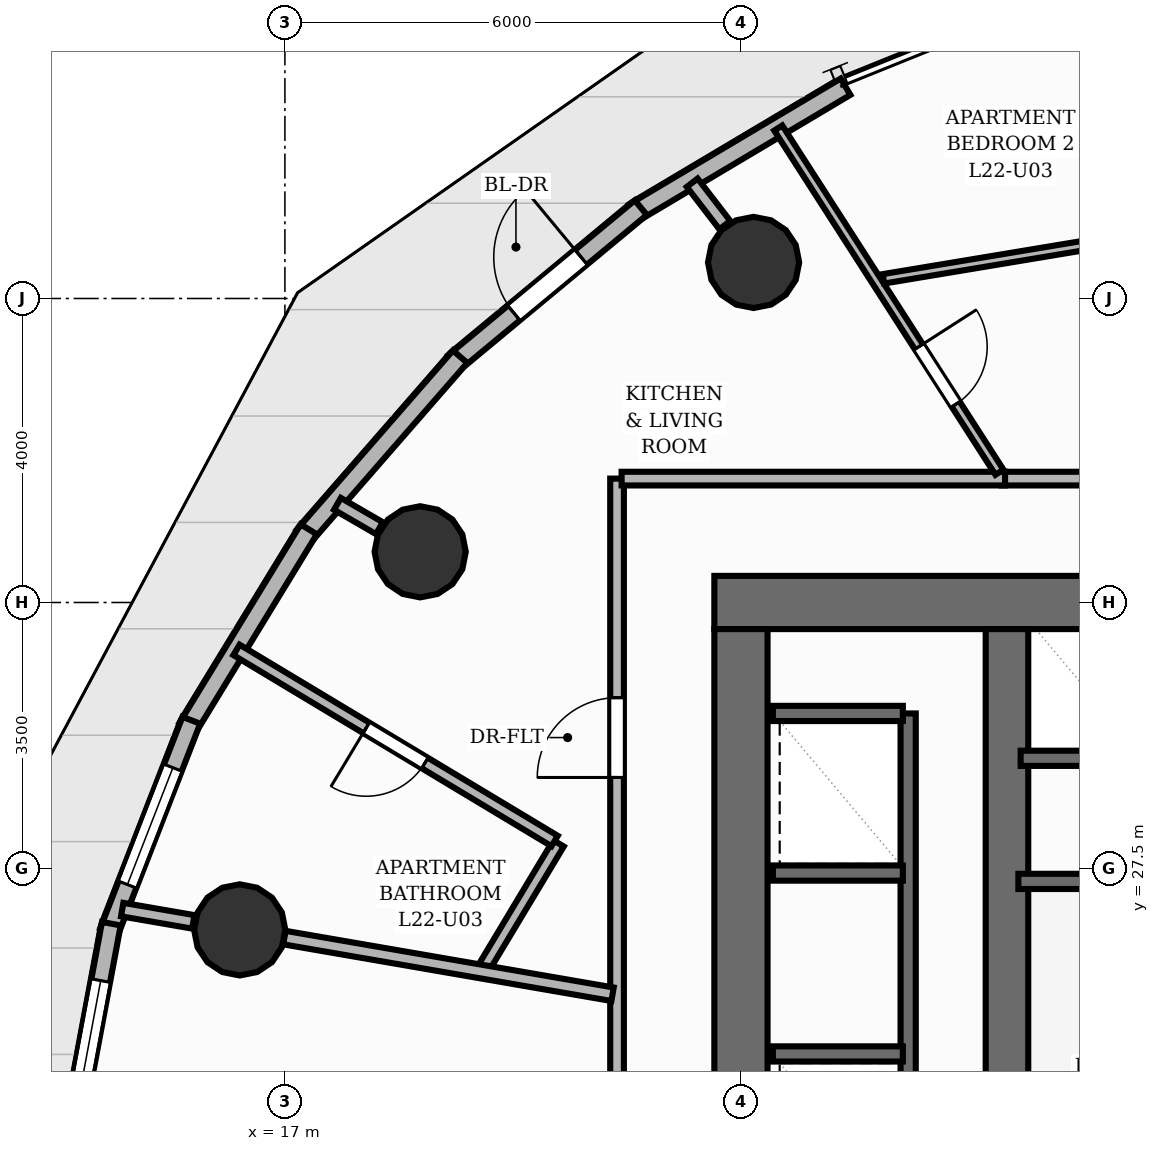
"""IFC4 building model, lengths in metres.
Left out: names, types, materials, properties, quantities, classifications, styles, units other than length and angle.
Written with IfcOpenShell. Run it as: python <this file> out.ifc"""

import sys

from ifc_helpers import new_model, si_unit, direction, frame, frame_2d, origin, origin_2d, place, context, subcontext, project, spatial, rectangle, circle, extrude, element, fill, save


model = new_model("IFC4")
c1 = context("Model", 3, precision=1e-05, world=origin(), true_north=direction((0.0, 1.0)))
c2 = subcontext(c1, "Body", "Model", "MODEL_VIEW")
j1 = project(units=[si_unit("LENGTHUNIT", "METRE"), si_unit("PLANEANGLEUNIT", "RADIAN")], contexts=[c1])
p1 = place(None, origin())
s1 = spatial("IfcSite", under=j1, at=p1, CompositionType="ELEMENT")
p2 = place(p1, origin())
s2 = spatial("IfcBuilding", under=s1, at=p2, CompositionType="ELEMENT")
p3 = place(p2, frame((0.0, 0.0, 77.28)))
s3 = spatial("IfcBuildingStorey", under=s2, at=p3, CompositionType="ELEMENT", Elevation=77.28)
p4 = place(p3, frame((22.65, 31.0, 0.0), z_axis=(0.0, 0.0, 1.0), x_axis=(1.0, 0.0, 0.0)))
e1 = element("IfcWall", 1, at=p4, inside=s3, PredefinedType="SHEAR", context=c2, shape_type="SweptSolid", body=[
    extrude(rectangle(XDim=18.7, YDim=0.7, at=frame_2d((9.35, 0.0))), origin(), (0.0, 0.0, 1.0), 3.2),
])
p5 = place(p4, frame((11.75, 0.0, 0.0)))
e2 = element("IfcOpeningElement", 2, at=p5, cuts=e1, PredefinedType="OPENING", context=c2, shape_type="SweptSolid", body=[
    extrude(rectangle(XDim=1.1, YDim=2.15, at=frame_2d((0.55, 1.075))), frame((0.0, 0.36, 0.0), z_axis=(0.0, -1.0, 0.0), x_axis=(1.0, 0.0, 0.0)), (0.0, 0.0, 1.0), 0.72),
])
p6 = place(p3, frame((23.0, 17.35, 0.0), z_axis=(0.0, 0.0, 1.0), x_axis=(0.0, 1.0, 0.0)))
e3 = element("IfcWall", 3, at=p6, inside=s3, PredefinedType="SHEAR", context=c2, shape_type="SweptSolid", body=[
    extrude(rectangle(XDim=13.3, YDim=0.7, at=frame_2d((6.65, 0.0))), origin(), (0.0, 0.0, 1.0), 3.2),
])
p7 = place(p3, frame((26.5, 17.35, 0.0), z_axis=(0.0, 0.0, 1.0), x_axis=(0.0, 1.0, 0.0)))
e4 = element("IfcWall", 4, at=p7, inside=s3, PredefinedType="SHEAR", context=c2, shape_type="SweptSolid", body=[
    extrude(rectangle(XDim=13.3, YDim=0.56, at=frame_2d((6.65, 0.0))), origin(), (0.0, 0.0, 1.0), 3.2),
])
for number, where, z_axis, x_axis in (
    (5, (23.167, 35.474, 0.0), (0.0, 0.0, 1.0), (1.0, 0.0, 0.0)),
    (6, (18.78, 31.667, 0.0), (0.0, 0.0, 1.0), (1.0, 0.0, 0.0)),
    (7, (16.406, 26.692, 0.0), (0.0, 0.0, 1.0), (1.0, 0.0, 0.0)),
):
    element("IfcColumn", number, at=place(p3, frame(where, z_axis=z_axis, x_axis=x_axis)), inside=s3, PredefinedType="COLUMN", context=c2, shape_type="SweptSolid", body=[
        extrude(circle(Radius=0.6, at=origin_2d()), origin(), (0.0, 0.0, 1.0), 3.2),
    ])
p8 = place(p3, frame((21.594, 36.132, 0.0), z_axis=(0.0, 0.0, 1.0), x_axis=(0.859543053771, 0.511063341196, 0.0)))
e8 = element("IfcWall", 8, at=p8, inside=s3, PredefinedType="SOLIDWALL", context=c2, shape_type="SweptSolid", body=[
    extrude(rectangle(XDim=3.236, YDim=0.25, at=frame_2d((1.618, 0.0))), origin(), (0.0, 0.0, 1.0), 2.96),
])
p9 = place(p3, frame((19.227, 34.157, 0.0), z_axis=(0.0, 0.0, 1.0), x_axis=(0.769611275013, 0.638512713557, 0.0)))
e9 = element("IfcWall", 9, at=p9, inside=s3, PredefinedType="SOLIDWALL", context=c2, shape_type="SweptSolid", body=[
    extrude(rectangle(XDim=3.192, YDim=0.25, at=frame_2d((1.596, 0.0))), origin(), (0.0, 0.0, 1.0), 2.96),
])
p10 = place(p9, frame((1.021, 0.0, 0.0)))
e10 = element("IfcOpeningElement", 10, at=p10, cuts=e9, PredefinedType="OPENING", context=c2, shape_type="SweptSolid", body=[
    extrude(rectangle(XDim=1.15, YDim=2.2, at=frame_2d((0.575, 1.1))), frame((0.0, 0.135, 0.0), z_axis=(0.0, -1.0, 0.0), x_axis=(1.0, 0.0, 0.0)), (0.0, 0.0, 1.0), 0.27),
])
p11 = place(p3, frame((17.248, 31.873, 0.0), z_axis=(0.0, 0.0, 1.0), x_axis=(0.656940925155, 0.753942054044, 0.0)))
e11 = element("IfcWall", 11, at=p11, inside=s3, PredefinedType="SOLIDWALL", context=c2, shape_type="SweptSolid", body=[
    extrude(rectangle(XDim=3.131, YDim=0.25, at=frame_2d((1.565, 0.0))), origin(), (0.0, 0.0, 1.0), 2.96),
])
p12 = place(p3, frame((15.719, 29.35, 0.0), z_axis=(0.0, 0.0, 1.0), x_axis=(0.520956264952, 0.853583370273, 0.0)))
e12 = element("IfcWall", 12, at=p12, inside=s3, PredefinedType="SOLIDWALL", context=c2, shape_type="SweptSolid", body=[
    extrude(rectangle(XDim=3.061, YDim=0.25, at=frame_2d((1.53, 0.0))), origin(), (0.0, 0.0, 1.0), 2.96),
])
p13 = place(p3, frame((14.686, 26.665, 0.0), z_axis=(0.0, 0.0, 1.0), x_axis=(0.362414720493, 0.93201693674, 0.0)))
e13 = element("IfcWall", 13, at=p13, inside=s3, PredefinedType="SOLIDWALL", context=c2, shape_type="SweptSolid", body=[
    extrude(rectangle(XDim=2.988, YDim=0.25, at=frame_2d((1.494, 0.0))), origin(), (0.0, 0.0, 1.0), 2.96),
])
p14 = place(p13, frame((0.669, 0.0, 0.85)))
e14 = element("IfcOpeningElement", 14, at=p14, cuts=e13, PredefinedType="OPENING", context=c2, shape_type="SweptSolid", body=[
    extrude(rectangle(XDim=1.65, YDim=1.37, at=frame_2d((0.825, 0.685))), frame((0.0, 0.135, 0.0), z_axis=(0.0, -1.0, 0.0), x_axis=(1.0, 0.0, 0.0)), (0.0, 0.0, 1.0), 0.27),
])
p15 = place(p3, frame((14.179, 23.9, 0.0), z_axis=(0.0, 0.0, 1.0), x_axis=(0.183975908968, 0.982930752861, 0.0)))
e15 = element("IfcWall", 15, at=p15, inside=s3, PredefinedType="SOLIDWALL", context=c2, shape_type="SweptSolid", body=[
    extrude(rectangle(XDim=2.923, YDim=0.25, at=frame_2d((1.462, 0.0))), origin(), (0.0, 0.0, 1.0), 2.96),
])
p16 = place(p15, frame((0.762, 0.0, 0.85)))
e16 = element("IfcOpeningElement", 16, at=p16, cuts=e15, PredefinedType="OPENING", context=c2, shape_type="SweptSolid", body=[
    extrude(rectangle(XDim=1.4, YDim=1.55, at=frame_2d((0.7, 0.775))), frame((0.0, 0.135, 0.0), z_axis=(0.0, -1.0, 0.0), x_axis=(1.0, 0.0, 0.0)), (0.0, 0.0, 1.0), 0.27),
])
p17 = place(p3, frame((26.65, 27.33, 0.0), z_axis=(0.0, 0.0, 1.0), x_axis=(1.0, 0.0, 0.0)))
e17 = element("IfcWall", 17, at=p17, inside=s3, PredefinedType="SHEAR", context=c2, shape_type="SweptSolid", body=[
    extrude(rectangle(XDim=3.24, YDim=0.2, at=frame_2d((1.62, 0.0))), origin(), (0.0, 0.0, 1.0), 3.2),
])
p18 = place(p3, frame((25.2, 18.46, 0.0), z_axis=(0.0, 0.0, 1.0), x_axis=(0.0, 1.0, 0.0)))
e18 = element("IfcWall", 18, at=p18, inside=s3, PredefinedType="SHEAR", context=c2, shape_type="SweptSolid", body=[
    extrude(rectangle(XDim=11.08, YDim=0.2, at=frame_2d((5.54, 0.0))), origin(), (0.0, 0.0, 1.0), 3.2),
])
for number, where, z_axis, x_axis in (
    (19, (23.42, 29.54, 0.0), (0.0, 0.0, 1.0), (1.0, 0.0, 0.0)),
    (20, (23.42, 25.06, 0.0), (0.0, 0.0, 1.0), (1.0, 0.0, 0.0)),
    (21, (23.42, 27.44, 0.0), (0.0, 0.0, 1.0), (1.0, 0.0, 0.0)),
):
    element("IfcWall", number, at=place(p3, frame(where, z_axis=z_axis, x_axis=x_axis)), inside=s3, PredefinedType="SHEAR", context=c2, shape_type="SweptSolid", body=[
        extrude(rectangle(XDim=1.71, YDim=0.2, at=frame_2d((0.855, 0.0))), origin(), (0.0, 0.0, 1.0), 3.2),
    ])
p19 = place(p3, frame((26.68, 28.95, 0.0), z_axis=(0.0, 0.0, 1.0), x_axis=(1.0, 0.0, 0.0)))
e22 = element("IfcWall", 22, at=p19, inside=s3, PredefinedType="SHEAR", context=c2, shape_type="SweptSolid", body=[
    extrude(rectangle(XDim=5.24, YDim=0.2, at=frame_2d((2.62, 0.0))), origin(), (0.0, 0.0, 1.0), 3.2),
])
p20 = place(p3, frame((22.788, 35.966, 0.0), z_axis=(0.0, 0.0, 1.0), x_axis=(-0.609945476355, 0.792443383387, 0.0)))
e23 = element("IfcWall", 23, at=p20, inside=s3, PredefinedType="PARTITIONING", context=c2, shape_type="SweptSolid", body=[
    extrude(rectangle(XDim=0.704, YDim=0.18, at=frame_2d((0.352, 0.0))), origin(), (0.0, 0.0, 1.0), 2.26),
])
p21 = place(p3, frame((18.243, 31.978, 0.0), z_axis=(0.0, 0.0, 1.0), x_axis=(-0.864928236137, 0.501895553212, 0.0)))
e24 = element("IfcWall", 24, at=p21, inside=s3, PredefinedType="PARTITIONING", context=c2, shape_type="SweptSolid", body=[
    extrude(rectangle(XDim=0.638, YDim=0.18, at=frame_2d((0.319, 0.0))), origin(), (0.0, 0.0, 1.0), 2.26),
])
p22 = place(p3, frame((15.794, 26.798, 0.0), z_axis=(0.0, 0.0, 1.0), x_axis=(-0.985396187556, 0.170277284302, 0.0)))
e25 = element("IfcWall", 25, at=p22, inside=s3, PredefinedType="PARTITIONING", context=c2, shape_type="SweptSolid", body=[
    extrude(rectangle(XDim=0.949, YDim=0.18, at=frame_2d((0.475, 0.0))), origin(), (0.0, 0.0, 1.0), 2.26),
])
p23 = place(p3, frame((26.431, 32.63, 0.0), z_axis=(0.0, 0.0, 1.0), x_axis=(1.0, 0.0, 0.0)))
e26 = element("IfcWall", 26, at=p23, inside=s3, PredefinedType="PARTITIONING", context=c2, shape_type="SweptSolid", body=[
    extrude(rectangle(XDim=16.199, YDim=0.18, at=frame_2d((8.099, 0.0))), origin(), (0.0, 0.0, 1.0), 2.955),
])
p24 = place(p23, frame((11.645, 0.0, 0.0)))
e27 = element("IfcOpeningElement", 27, at=p24, cuts=e26, PredefinedType="OPENING", context=c2, shape_type="SweptSolid", body=[
    extrude(rectangle(XDim=1.05, YDim=2.15, at=frame_2d((0.525, 1.075))), frame((0.0, 0.1, 0.0), z_axis=(0.0, -1.0, 0.0), x_axis=(1.0, 0.0, 0.0)), (0.0, 0.0, 1.0), 0.2),
])
p25 = place(p3, frame((21.37, 15.37, 0.0), z_axis=(0.0, 0.0, 1.0), x_axis=(0.0, 1.0, 0.0)))
e28 = element("IfcWall", 28, at=p25, inside=s3, PredefinedType="PARTITIONING", context=c2, shape_type="SweptSolid", body=[
    extrude(rectangle(XDim=17.26, YDim=0.18, at=frame_2d((8.63, 0.0))), origin(), (0.0, 0.0, 1.0), 2.955),
])
p26 = place(p25, frame((13.328, 0.0, 0.0)))
e29 = element("IfcOpeningElement", 29, at=p26, cuts=e28, PredefinedType="OPENING", context=c2, shape_type="SweptSolid", body=[
    extrude(rectangle(XDim=1.05, YDim=2.15, at=frame_2d((0.525, 1.075))), frame((0.0, 0.1, 0.0), z_axis=(0.0, -1.0, 0.0), x_axis=(1.0, 0.0, 0.0)), (0.0, 0.0, 1.0), 0.2),
])
p27 = place(p25, frame((4.718, 0.0, 0.0)))
e30 = element("IfcOpeningElement", 30, at=p27, cuts=e28, PredefinedType="OPENING", context=c2, shape_type="SweptSolid", body=[
    extrude(rectangle(XDim=1.05, YDim=2.15, at=frame_2d((0.525, 1.075))), frame((0.0, 0.1, 0.0), z_axis=(0.0, -1.0, 0.0), x_axis=(1.0, 0.0, 0.0)), (0.0, 0.0, 1.0), 0.2),
])
p28 = place(p3, frame((21.43, 32.63, 0.0), z_axis=(0.0, 0.0, 1.0), x_axis=(1.0, 0.0, 0.0)))
e31 = element("IfcWall", 31, at=p28, inside=s3, PredefinedType="PARTITIONING", context=c2, shape_type="SweptSolid", body=[
    extrude(rectangle(XDim=5.045, YDim=0.18, at=frame_2d((2.522, 0.0))), origin(), (0.0, 0.0, 1.0), 2.955),
])
p29 = place(p3, frame((19.586, 26.143, 0.0), z_axis=(0.0, 0.0, 1.0), x_axis=(0.514969792399, 0.857208325272, 0.0)))
e32 = element("IfcWall", 32, at=p29, inside=s3, PredefinedType="PLUMBINGWALL", context=c2, shape_type="SweptSolid", body=[
    extrude(rectangle(XDim=1.969, YDim=0.16, at=frame_2d((0.984, 0.0))), origin(), (0.0, 0.0, 1.0), 2.955),
])
p30 = place(p3, frame((20.549, 27.862, 0.0), z_axis=(0.0, 0.0, 1.0), x_axis=(-0.857214854591, 0.514958923672, 0.0)))
e33 = element("IfcWall", 33, at=p30, inside=s3, PredefinedType="PLUMBINGWALL", context=c2, shape_type="SweptSolid", body=[
    extrude(rectangle(XDim=4.883, YDim=0.16, at=frame_2d((2.441, 0.0))), origin(), (0.0, 0.0, 1.0), 2.955),
])
p31 = place(p30, frame((1.991, 0.0, 0.0)))
e34 = element("IfcOpeningElement", 34, at=p31, cuts=e33, PredefinedType="OPENING", context=c2, shape_type="SweptSolid", body=[
    extrude(rectangle(XDim=0.9, YDim=2.1, at=frame_2d((0.45, 1.05))), frame((0.0, 0.09, 0.0), z_axis=(0.0, -1.0, 0.0), x_axis=(1.0, 0.0, 0.0)), (0.0, 0.0, 1.0), 0.18),
])
p32 = place(p3, frame((23.491, 37.243, 0.0), z_axis=(0.0, 0.0, 1.0), x_axis=(0.540565030624, -0.841302233247, 0.0)))
e35 = element("IfcWall", 35, at=p32, inside=s3, PredefinedType="PARTITIONING", context=c2, shape_type="SweptSolid", body=[
    extrude(rectangle(XDim=5.383, YDim=0.125, at=frame_2d((2.691, 0.0))), origin(), (0.0, 0.0, 1.0), 2.955),
])
p33 = place(p32, frame((3.42, 0.0, 0.0)))
e36 = element("IfcOpeningElement", 36, at=p33, cuts=e35, PredefinedType="OPENING", context=c2, shape_type="SweptSolid", body=[
    extrude(rectangle(XDim=0.9, YDim=2.1, at=frame_2d((0.45, 1.05))), frame((0.0, 0.073, 0.0), z_axis=(0.0, -1.0, 0.0), x_axis=(1.0, 0.0, 0.0)), (0.0, 0.0, 1.0), 0.145),
])
p34 = place(p3, frame((21.311, 25.845, 0.0), z_axis=(0.0, 0.0, 1.0), x_axis=(-0.98541310568, 0.170179349963, 0.0)))
e37 = element("IfcWall", 37, at=p34, inside=s3, PredefinedType="PARTITIONING", context=c2, shape_type="SweptSolid", body=[
    extrude(rectangle(XDim=4.381, YDim=0.18, at=frame_2d((2.191, 0.0))), origin(), (0.0, 0.0, 1.0), 2.26),
])
p35 = place(p3, frame((24.875, 35.259, 0.0), z_axis=(0.0, 0.0, 1.0), x_axis=(0.986466792703, 0.163961174958, 0.0)))
e38 = element("IfcWall", 38, at=p35, inside=s3, PredefinedType="PARTITIONING", context=c2, shape_type="SweptSolid", body=[
    extrude(rectangle(XDim=10.128, YDim=0.125, at=frame_2d((5.064, 0.0))), origin(), (0.0, 0.0, 1.0), 2.955),
])
p36 = place(p35, frame((5.034, 0.0, 0.0)))
e39 = element("IfcOpeningElement", 39, at=p36, cuts=e38, PredefinedType="OPENING", context=c2, shape_type="SweptSolid", body=[
    extrude(rectangle(XDim=0.9, YDim=2.1, at=frame_2d((0.45, 1.05))), frame((0.0, 0.073, 0.0), z_axis=(0.0, -1.0, 0.0), x_axis=(1.0, 0.0, 0.0)), (0.0, 0.0, 1.0), 0.145),
])
p37 = place(p10, origin())
e40 = element("IfcDoor", 40, at=p37, inside=s3, OperationType="SINGLE_SWING_RIGHT", PredefinedType="DOOR", context=c2, shape_type="SweptSolid", body=[
    extrude(rectangle(XDim=1.15, YDim=2.2, at=frame_2d((0.575, 1.1))), frame((0.0, 0.025, 0.0), z_axis=(0.0, -1.0, 0.0), x_axis=(1.0, 0.0, 0.0)), (0.0, 0.0, 1.0), 0.05),
])
fill(e10, e40)
p38 = place(p14, origin())
e41 = element("IfcWindow", 41, at=p38, inside=s3, PartitioningType="SINGLE_PANEL", PredefinedType="WINDOW", context=c2, shape_type="SweptSolid", body=[
    extrude(rectangle(XDim=1.65, YDim=1.37, at=frame_2d((0.825, 0.685))), frame((0.0, 0.03, 0.0), z_axis=(0.0, -1.0, 0.0), x_axis=(1.0, 0.0, 0.0)), (0.0, 0.0, 1.0), 0.06),
])
fill(e14, e41)
p39 = place(p16, origin())
e42 = element("IfcWindow", 42, at=p39, inside=s3, PartitioningType="SINGLE_PANEL", PredefinedType="WINDOW", context=c2, shape_type="SweptSolid", body=[
    extrude(rectangle(XDim=1.4, YDim=1.55, at=frame_2d((0.7, 0.775))), frame((0.0, 0.03, 0.0), z_axis=(0.0, -1.0, 0.0), x_axis=(1.0, 0.0, 0.0)), (0.0, 0.0, 1.0), 0.06),
])
fill(e16, e42)
p40 = place(p26, origin())
e43 = element("IfcDoor", 43, at=p40, inside=s3, OperationType="SINGLE_SWING_LEFT", PredefinedType="DOOR", context=c2, shape_type="SweptSolid", body=[
    extrude(rectangle(XDim=1.05, YDim=2.15, at=frame_2d((0.525, 1.075))), frame((0.0, 0.025, 0.0), z_axis=(0.0, -1.0, 0.0), x_axis=(1.0, 0.0, 0.0)), (0.0, 0.0, 1.0), 0.05),
])
fill(e29, e43)
p41 = place(p31, origin())
e44 = element("IfcDoor", 44, at=p41, inside=s3, OperationType="SINGLE_SWING_RIGHT", PredefinedType="DOOR", context=c2, shape_type="SweptSolid", body=[
    extrude(rectangle(XDim=0.9, YDim=2.1, at=frame_2d((0.45, 1.05))), frame((0.0, 0.025, 0.0), z_axis=(0.0, -1.0, 0.0), x_axis=(1.0, 0.0, 0.0)), (0.0, 0.0, 1.0), 0.05),
])
fill(e34, e44)
p42 = place(p33, origin())
e45 = element("IfcDoor", 45, at=p42, inside=s3, OperationType="SINGLE_SWING_LEFT", PredefinedType="DOOR", context=c2, shape_type="SweptSolid", body=[
    extrude(rectangle(XDim=0.9, YDim=2.1, at=frame_2d((0.45, 1.05))), frame((0.0, 0.025, 0.0), z_axis=(0.0, -1.0, 0.0), x_axis=(1.0, 0.0, 0.0)), (0.0, 0.0, 1.0), 0.05),
])
fill(e36, e45)
save(model, sys.argv[1])
